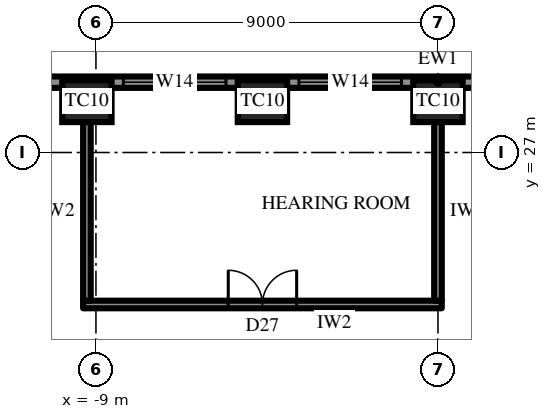
"""IFC4 building model, lengths in metres.
Left out: names, types, materials, properties, quantities, classifications, styles, units other than length and angle.
Written with IfcOpenShell. Run it as: python <this file> out.ifc"""

import sys

from ifc_helpers import new_model, si_unit, direction, frame, frame_2d, origin, origin_2d, place, context, subcontext, project, spatial, rectangle, extrude, element, fill, save


model = new_model("IFC4")
c1 = context("Model", 3, precision=1e-05, world=origin(), true_north=direction((0.0, 1.0)))
c2 = subcontext(c1, "Body", "Model", "MODEL_VIEW")
j1 = project(units=[si_unit("LENGTHUNIT", "METRE"), si_unit("PLANEANGLEUNIT", "RADIAN")], contexts=[c1])
p1 = place(None, origin())
s1 = spatial("IfcSite", under=j1, at=p1, CompositionType="ELEMENT")
p2 = place(p1, origin())
s2 = spatial("IfcBuilding", under=s1, at=p2, CompositionType="ELEMENT")
p3 = place(p2, frame((0.0, 0.0, 240.7)))
s3 = spatial("IfcBuildingStorey", under=s2, at=p3, CompositionType="ELEMENT", Elevation=240.7)
for number, where, z_axis, x_axis in (
    (1, (0.0, 28.35, 0.0), (0.0, 0.0, 1.0), (-1.0, 0.0, 0.0)),
    (2, (-4.619, 28.35, 0.0), (0.0, 0.0, 1.0), (-1.0, 0.0, 0.0)),
    (3, (-9.238, 28.35, 0.0), (0.0, 0.0, 1.0), (-1.0, 0.0, 0.0)),
):
    element("IfcColumn", number, at=place(p3, frame(where, z_axis=z_axis, x_axis=x_axis)), inside=s3, PredefinedType="COLUMN", context=c2, shape_type="SweptSolid", body=[
        extrude(rectangle(XDim=1.3, YDim=1.1, at=origin_2d()), origin(), (0.0, 0.0, 1.0), 4.2),
    ])
p4 = place(p3, frame((12.556, 28.85, 0.0), z_axis=(0.0, 0.0, 1.0), x_axis=(-1.0, 0.0, 0.0)))
e4 = element("IfcWall", 4, at=p4, inside=s3, PredefinedType="SOLIDWALL", context=c2, shape_type="SweptSolid", body=[
    extrude(rectangle(XDim=25.113, YDim=0.3, at=frame_2d((12.556, 0.0))), origin(), (0.0, 0.0, 1.0), 2.8),
])
p5 = place(p4, frame((4.278, 0.0, 0.6)))
e5 = element("IfcOpeningElement", 5, at=p5, cuts=e4, PredefinedType="OPENING", context=c2, shape_type="SweptSolid", body=[
    extrude(rectangle(XDim=2.7, YDim=1.95, at=frame_2d((1.35, 0.975))), frame((0.0, 0.16, 0.0), z_axis=(0.0, -1.0, 0.0), x_axis=(1.0, 0.0, 0.0)), (0.0, 0.0, 1.0), 0.32),
])
p6 = place(p4, frame((9.647, 0.0, 0.0)))
e6 = element("IfcOpeningElement", 6, at=p6, cuts=e4, PredefinedType="OPENING", context=c2, shape_type="SweptSolid", body=[
    extrude(rectangle(XDim=1.2, YDim=2.4, at=frame_2d((0.6, 1.2))), frame((0.0, 0.16, 0.0), z_axis=(0.0, -1.0, 0.0), x_axis=(1.0, 0.0, 0.0)), (0.0, 0.0, 1.0), 0.32),
])
p7 = place(p4, frame((13.516, 0.0, 0.6)))
e7 = element("IfcOpeningElement", 7, at=p7, cuts=e4, PredefinedType="OPENING", context=c2, shape_type="SweptSolid", body=[
    extrude(rectangle(XDim=2.7, YDim=1.95, at=frame_2d((1.35, 0.975))), frame((0.0, 0.16, 0.0), z_axis=(0.0, -1.0, 0.0), x_axis=(1.0, 0.0, 0.0)), (0.0, 0.0, 1.0), 0.32),
])
p8 = place(p4, frame((18.135, 0.0, 0.6)))
e8 = element("IfcOpeningElement", 8, at=p8, cuts=e4, PredefinedType="OPENING", context=c2, shape_type="SweptSolid", body=[
    extrude(rectangle(XDim=2.7, YDim=1.95, at=frame_2d((1.35, 0.975))), frame((0.0, 0.16, 0.0), z_axis=(0.0, -1.0, 0.0), x_axis=(1.0, 0.0, 0.0)), (0.0, 0.0, 1.0), 0.32),
])
p9 = place(p3, frame((0.1, 23.0, 0.0), z_axis=(0.0, 0.0, 1.0), x_axis=(-1.0, 0.0, 0.0)))
e9 = element("IfcWall", 9, at=p9, inside=s3, PredefinedType="PARTITIONING", context=c2, shape_type="SweptSolid", body=[
    extrude(rectangle(XDim=9.438, YDim=0.2, at=frame_2d((4.719, 0.0))), origin(), (0.0, 0.0, 1.0), 4.0),
])
p10 = place(p9, frame((3.819, 0.0, 0.0)))
e10 = element("IfcOpeningElement", 10, at=p10, cuts=e9, PredefinedType="OPENING", context=c2, shape_type="SweptSolid", body=[
    extrude(rectangle(XDim=1.8, YDim=2.4, at=frame_2d((0.9, 1.2))), frame((0.0, 0.11, 0.0), z_axis=(0.0, -1.0, 0.0), x_axis=(1.0, 0.0, 0.0)), (0.0, 0.0, 1.0), 0.22),
])
for number, where, z_axis, x_axis in (
    (11, (0.0, 23.1, 0.0), (0.0, 0.0, 1.0), (0.0, 1.0, 0.0)),
    (12, (-9.238, 23.1, 0.0), (0.0, 0.0, 1.0), (0.0, 1.0, 0.0)),
):
    element("IfcWall", number, at=place(p3, frame(where, z_axis=z_axis, x_axis=x_axis)), inside=s3, PredefinedType="PARTITIONING", context=c2, shape_type="SweptSolid", body=[
        extrude(rectangle(XDim=4.7, YDim=0.2, at=frame_2d((2.35, 0.0))), origin(), (0.0, 0.0, 1.0), 2.992),
    ])
p11 = place(p7, origin())
e13 = element("IfcWindow", 13, at=p11, inside=s3, PartitioningType="SINGLE_PANEL", PredefinedType="WINDOW", context=c2, shape_type="SweptSolid", body=[
    extrude(rectangle(XDim=2.7, YDim=1.95, at=frame_2d((1.35, 0.975))), frame((0.0, 0.03, 0.0), z_axis=(0.0, -1.0, 0.0), x_axis=(1.0, 0.0, 0.0)), (0.0, 0.0, 1.0), 0.06),
])
fill(e7, e13)
p12 = place(p8, origin())
e14 = element("IfcWindow", 14, at=p12, inside=s3, PartitioningType="SINGLE_PANEL", PredefinedType="WINDOW", context=c2, shape_type="SweptSolid", body=[
    extrude(rectangle(XDim=2.7, YDim=1.95, at=frame_2d((1.35, 0.975))), frame((0.0, 0.03, 0.0), z_axis=(0.0, -1.0, 0.0), x_axis=(1.0, 0.0, 0.0)), (0.0, 0.0, 1.0), 0.06),
])
fill(e8, e14)
p13 = place(p10, frame((1.8, 0.0, 0.0), z_axis=(0.0, 0.0, 1.0), x_axis=(-1.0, 0.0, 0.0)))
e15 = element("IfcDoor", 15, at=p13, inside=s3, OperationType="DOUBLE_DOOR_SINGLE_SWING", PredefinedType="DOOR", context=c2, shape_type="SweptSolid", body=[
    extrude(rectangle(XDim=1.8, YDim=2.4, at=frame_2d((0.9, 1.2))), frame((0.0, 0.025, 0.0), z_axis=(0.0, -1.0, 0.0), x_axis=(1.0, 0.0, 0.0)), (0.0, 0.0, 1.0), 0.05),
])
fill(e10, e15)
save(model, sys.argv[1])
